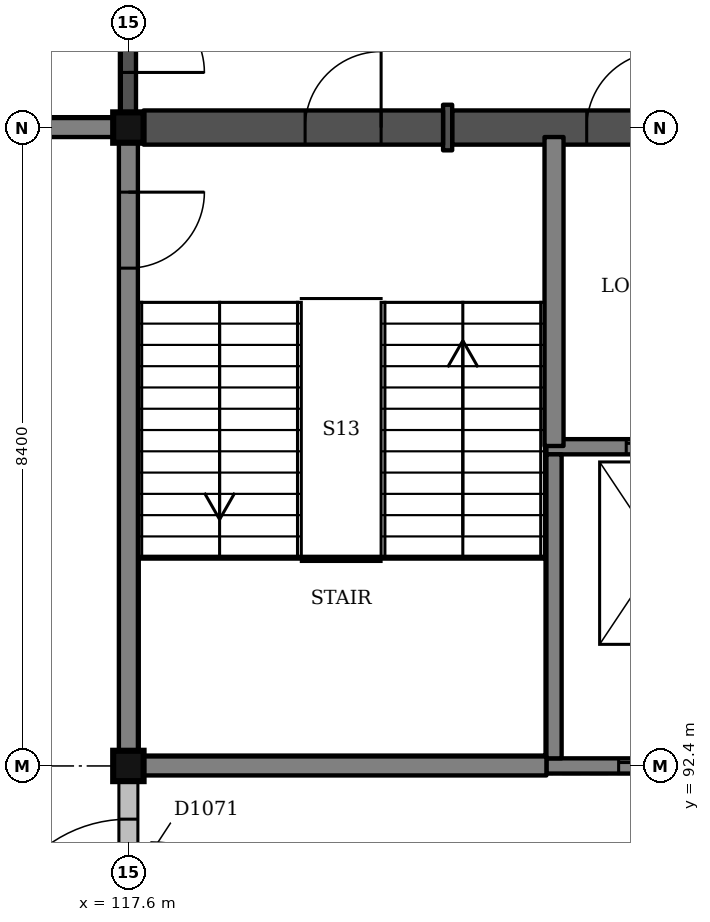
"""IFC4 building model, lengths in metres.
Left out: names, types, materials, properties, quantities, classifications, styles, units other than length and angle.
Written with IfcOpenShell. Run it as: python <this file> out.ifc"""

import sys

from ifc_helpers import new_model, si_unit, direction, frame, frame_2d, origin, origin_2d, place, context, subcontext, project, spatial, rectangle, extrude, element, fill, save


model = new_model("IFC4")
c1 = context("Model", 3, precision=1e-05, world=origin(), true_north=direction((0.0, 1.0)))
c2 = subcontext(c1, "Body", "Model", "MODEL_VIEW")
j1 = project(units=[si_unit("LENGTHUNIT", "METRE"), si_unit("PLANEANGLEUNIT", "RADIAN")], contexts=[c1])
p1 = place(None, origin())
s1 = spatial("IfcSite", under=j1, at=p1, CompositionType="ELEMENT")
p2 = place(p1, origin())
s2 = spatial("IfcBuilding", under=s1, at=p2, CompositionType="ELEMENT")
p3 = place(p2, frame((0.0, 0.0, 4.5)))
s3 = spatial("IfcBuildingStorey", under=s2, at=p3, CompositionType="ELEMENT", Elevation=4.5)
for number, where, z_axis, x_axis in (
    (1, (117.6, 92.4, -1.5), (0.0, 0.0, 1.0), (1.0, 0.0, 0.0)),
    (2, (117.6, 100.8, -1.5), (0.0, 0.0, 1.0), (1.0, 0.0, 0.0)),
):
    element("IfcColumn", number, at=place(p3, frame(where, z_axis=z_axis, x_axis=x_axis)), inside=s3, PredefinedType="COLUMN", context=c2, shape_type="SweptSolid", body=[
        extrude(rectangle(XDim=0.4, YDim=0.4, at=origin_2d()), origin(), (0.0, 0.0, 1.0), 6.0),
    ])
p4 = place(p3, frame((123.1, 92.4, 0.0), z_axis=(0.0, 0.0, 1.0), x_axis=(1.0, 0.0, 0.0)))
e3 = element("IfcWall", 3, at=p4, inside=s3, PredefinedType="SHEAR", context=c2, shape_type="SweptSolid", body=[
    extrude(rectangle(XDim=2.7, YDim=0.2, at=frame_2d((1.35, 0.0))), origin(), (0.0, 0.0, 1.0), 4.5),
])
p5 = place(p4, frame((0.95, 0.0, 0.0)))
e4 = element("IfcOpeningElement", 4, at=p5, cuts=e3, PredefinedType="OPENING", context=c2, shape_type="SweptSolid", body=[
    extrude(rectangle(XDim=1.1, YDim=2.1, at=frame_2d((0.55, 1.05))), frame((0.0, 0.11, 0.0), z_axis=(0.0, -1.0, 0.0), x_axis=(1.0, 0.0, 0.0)), (0.0, 0.0, 1.0), 0.22),
])
p6 = place(p3, frame((123.1, 96.6, 0.0), z_axis=(0.0, 0.0, 1.0), x_axis=(1.0, 0.0, 0.0)))
e5 = element("IfcWall", 5, at=p6, inside=s3, PredefinedType="SHEAR", context=c2, shape_type="SweptSolid", body=[
    extrude(rectangle(XDim=3.0, YDim=0.2, at=frame_2d((1.5, 0.0))), origin(), (0.0, 0.0, 1.0), 4.5),
])
p7 = place(p6, frame((1.05, 0.0, 0.0)))
e6 = element("IfcOpeningElement", 6, at=p7, cuts=e5, PredefinedType="OPENING", context=c2, shape_type="SweptSolid", body=[
    extrude(rectangle(XDim=1.1, YDim=2.1, at=frame_2d((0.55, 1.05))), frame((0.0, 0.11, 0.0), z_axis=(0.0, -1.0, 0.0), x_axis=(1.0, 0.0, 0.0)), (0.0, 0.0, 1.0), 0.22),
])
p8 = place(p3, frame((123.2, 92.5, 0.0), z_axis=(0.0, 0.0, 1.0), x_axis=(0.0, 1.0, 0.0)))
e7 = element("IfcWall", 7, at=p8, inside=s3, PredefinedType="SHEAR", context=c2, shape_type="SweptSolid", body=[
    extrude(rectangle(XDim=4.0, YDim=0.2, at=frame_2d((2.0, 0.0))), origin(), (0.0, 0.0, 1.0), 4.5),
])
p9 = place(p3, frame((117.8, 92.4, 0.0), z_axis=(0.0, 0.0, 1.0), x_axis=(1.0, 0.0, 0.0)))
e8 = element("IfcWall", 8, at=p9, inside=s3, PredefinedType="SHEAR", context=c2, shape_type="SweptSolid", body=[
    extrude(rectangle(XDim=5.3, YDim=0.25, at=frame_2d((2.65, 0.0))), origin(), (0.0, 0.0, 1.0), 4.5),
])
p10 = place(p3, frame((117.6, 92.6, 0.0), z_axis=(0.0, 0.0, 1.0), x_axis=(0.0, 1.0, 0.0)))
e9 = element("IfcWall", 9, at=p10, inside=s3, PredefinedType="SHEAR", context=c2, shape_type="SweptSolid", body=[
    extrude(rectangle(XDim=8.0, YDim=0.25, at=frame_2d((4.0, 0.0))), origin(), (0.0, 0.0, 1.0), 4.5),
])
p11 = place(p10, frame((6.35, 0.0, 0.0)))
e10 = element("IfcOpeningElement", 10, at=p11, cuts=e9, PredefinedType="OPENING", context=c2, shape_type="SweptSolid", body=[
    extrude(rectangle(XDim=1.0, YDim=2.1, at=frame_2d((0.5, 1.05))), frame((0.0, 0.135, 0.0), z_axis=(0.0, -1.0, 0.0), x_axis=(1.0, 0.0, 0.0)), (0.0, 0.0, 1.0), 0.27),
])
p12 = place(p3, frame((123.2, 96.61, 0.0), z_axis=(0.0, 0.0, 1.0), x_axis=(0.0, 1.0, 0.0)))
e11 = element("IfcWall", 11, at=p12, inside=s3, PredefinedType="SHEAR", context=c2, shape_type="SweptSolid", body=[
    extrude(rectangle(XDim=4.065, YDim=0.25, at=frame_2d((2.032, 0.0))), origin(), (0.0, 0.0, 1.0), 4.5),
])
p13 = place(p3, frame((111.875, 100.8, 0.0), z_axis=(0.0, 0.0, 1.0), x_axis=(1.0, 0.0, 0.0)))
e12 = element("IfcWall", 12, at=p13, inside=s3, PredefinedType="SHEAR", context=c2, shape_type="SweptSolid", body=[
    extrude(rectangle(XDim=5.525, YDim=0.25, at=frame_2d((2.762, 0.0))), origin(), (0.0, 0.0, 1.0), 4.5),
])
p14 = place(p13, frame((2.45, 0.0, 0.0)))
e13 = element("IfcOpeningElement", 13, at=p14, cuts=e12, PredefinedType="OPENING", context=c2, shape_type="SweptSolid", body=[
    extrude(rectangle(XDim=1.0, YDim=2.1, at=frame_2d((0.5, 1.05))), frame((0.0, 0.135, 0.0), z_axis=(0.0, -1.0, 0.0), x_axis=(1.0, 0.0, 0.0)), (0.0, 0.0, 1.0), 0.27),
])
p15 = place(p3, frame((125.8, 100.8, 0.0), z_axis=(0.0, 0.0, 1.0), x_axis=(-1.0, 0.0, 0.0)))
e14 = element("IfcWall", 14, at=p15, inside=s3, PredefinedType="SOLIDWALL", context=c2, shape_type="SweptSolid", body=[
    extrude(rectangle(XDim=3.94, YDim=0.45, at=frame_2d((1.97, 0.0))), origin(), (0.0, 0.0, 1.0), 3.35),
])
p16 = place(p15, frame((1.17, 0.0, 0.0)))
e15 = element("IfcOpeningElement", 15, at=p16, cuts=e14, PredefinedType="OPENING", context=c2, shape_type="SweptSolid", body=[
    extrude(rectangle(XDim=1.0, YDim=2.1, at=frame_2d((0.5, 1.05))), frame((0.0, 0.235, 0.0), z_axis=(0.0, -1.0, 0.0), x_axis=(1.0, 0.0, 0.0)), (0.0, 0.0, 1.0), 0.47),
])
p17 = place(p3, frame((121.86, 100.8, 0.0), z_axis=(0.0, 0.0, 1.0), x_axis=(-1.0, 0.0, 0.0)))
e16 = element("IfcWall", 16, at=p17, inside=s3, PredefinedType="SOLIDWALL", context=c2, shape_type="SweptSolid", body=[
    extrude(rectangle(XDim=0.12, YDim=0.6, at=frame_2d((0.06, 0.0))), origin(), (0.0, 0.0, 1.0), 3.35),
])
p18 = place(p3, frame((121.74, 100.8, 0.0), z_axis=(0.0, 0.0, 1.0), x_axis=(-1.0, 0.0, 0.0)))
e17 = element("IfcWall", 17, at=p18, inside=s3, PredefinedType="SOLIDWALL", context=c2, shape_type="SweptSolid", body=[
    extrude(rectangle(XDim=3.94, YDim=0.45, at=frame_2d((1.97, 0.0))), origin(), (0.0, 0.0, 1.0), 3.35),
])
p19 = place(p18, frame((1.815, 0.0, 0.0), z_axis=(0.0, 0.0, 1.0), x_axis=(-1.0, 0.0, 0.0)))
e18 = element("IfcOpeningElement", 18, at=p19, cuts=e17, PredefinedType="OPENING", context=c2, shape_type="SweptSolid", body=[
    extrude(rectangle(XDim=1.0, YDim=2.1, at=frame_2d((0.5, 1.05))), frame((0.0, 0.235, 0.0), z_axis=(0.0, -1.0, 0.0), x_axis=(1.0, 0.0, 0.0)), (0.0, 0.0, 1.0), 0.47),
])
p20 = place(p3, frame((117.6, 101.0, 0.0), z_axis=(0.0, 0.0, 1.0), x_axis=(0.0, 1.0, 0.0)))
e19 = element("IfcWall", 19, at=p20, inside=s3, PredefinedType="SOLIDWALL", context=c2, shape_type="SweptSolid", body=[
    extrude(rectangle(XDim=8.0, YDim=0.2, at=frame_2d((4.0, 0.0))), origin(), (0.0, 0.0, 1.0), 3.65),
])
p21 = place(p20, frame((1.525, 0.0, 0.0), z_axis=(0.0, 0.0, 1.0), x_axis=(-1.0, 0.0, 0.0)))
e20 = element("IfcOpeningElement", 20, at=p21, cuts=e19, PredefinedType="OPENING", context=c2, shape_type="SweptSolid", body=[
    extrude(rectangle(XDim=1.0, YDim=2.1, at=frame_2d((0.5, 1.05))), frame((0.0, 0.11, 0.0), z_axis=(0.0, -1.0, 0.0), x_axis=(1.0, 0.0, 0.0)), (0.0, 0.0, 1.0), 0.22),
])
p22 = place(p3, frame((117.6, 84.2, 0.0), z_axis=(0.0, 0.0, 1.0), x_axis=(0.0, 1.0, 0.0)))
e21 = element("IfcWall", 21, at=p22, inside=s3, PredefinedType="SOLIDWALL", context=c2, shape_type="SweptSolid", body=[
    extrude(rectangle(XDim=8.0, YDim=0.25, at=frame_2d((4.0, 0.0))), origin(), (0.0, 0.0, 1.0), 3.65),
])
p23 = place(p22, frame((5.7, 0.0, 0.0)))
e22 = element("IfcOpeningElement", 22, at=p23, cuts=e21, PredefinedType="OPENING", context=c2, shape_type="SweptSolid", body=[
    extrude(rectangle(XDim=1.8, YDim=2.1, at=frame_2d((0.9, 1.05))), frame((0.0, 0.135, 0.0), z_axis=(0.0, -1.0, 0.0), x_axis=(1.0, 0.0, 0.0)), (0.0, 0.0, 1.0), 0.27),
])
p24 = place(p16, origin())
e23 = element("IfcDoor", 23, at=p24, inside=s3, OperationType="SINGLE_SWING_LEFT", PredefinedType="DOOR", context=c2, shape_type="SweptSolid", body=[
    extrude(rectangle(XDim=1.0, YDim=2.1, at=frame_2d((0.5, 1.05))), frame((0.0, 0.025, 0.0), z_axis=(0.0, -1.0, 0.0), x_axis=(1.0, 0.0, 0.0)), (0.0, 0.0, 1.0), 0.05),
])
fill(e15, e23)
p25 = place(p23, origin())
e24 = element("IfcDoor", 24, at=p25, inside=s3, OperationType="DOUBLE_DOOR_SINGLE_SWING", PredefinedType="DOOR", context=c2, shape_type="SweptSolid", body=[
    extrude(rectangle(XDim=1.8, YDim=2.1, at=frame_2d((0.9, 1.05))), frame((0.0, 0.025, 0.0), z_axis=(0.0, -1.0, 0.0), x_axis=(1.0, 0.0, 0.0)), (0.0, 0.0, 1.0), 0.05),
])
fill(e22, e24)
p26 = place(p11, origin())
e25 = element("IfcDoor", 25, at=p26, inside=s3, OperationType="SINGLE_SWING_RIGHT", PredefinedType="DOOR", context=c2, shape_type="SweptSolid", body=[
    extrude(rectangle(XDim=1.0, YDim=2.1, at=frame_2d((0.5, 1.05))), frame((0.0, 0.025, 0.0), z_axis=(0.0, -1.0, 0.0), x_axis=(1.0, 0.0, 0.0)), (0.0, 0.0, 1.0), 0.05),
])
fill(e10, e25)
p27 = place(p19, origin())
e26 = element("IfcDoor", 26, at=p27, inside=s3, OperationType="SINGLE_SWING_LEFT", PredefinedType="DOOR", context=c2, shape_type="SweptSolid", body=[
    extrude(rectangle(XDim=1.0, YDim=2.1, at=frame_2d((0.5, 1.05))), frame((0.0, 0.025, 0.0), z_axis=(0.0, -1.0, 0.0), x_axis=(1.0, 0.0, 0.0)), (0.0, 0.0, 1.0), 0.05),
])
fill(e18, e26)
p28 = place(p21, origin())
e27 = element("IfcDoor", 27, at=p28, inside=s3, OperationType="SINGLE_SWING_LEFT", PredefinedType="DOOR", context=c2, shape_type="SweptSolid", body=[
    extrude(rectangle(XDim=1.0, YDim=2.1, at=frame_2d((0.5, 1.05))), frame((0.0, 0.025, 0.0), z_axis=(0.0, -1.0, 0.0), x_axis=(1.0, 0.0, 0.0)), (0.0, 0.0, 1.0), 0.05),
])
fill(e20, e27)
p29 = place(p5, origin())
e28 = element("IfcDoor", 28, at=p29, inside=s3, OperationType="SLIDING_TO_RIGHT", PredefinedType="DOOR", context=c2, shape_type="SweptSolid", body=[
    extrude(rectangle(XDim=1.1, YDim=2.1, at=frame_2d((0.55, 1.05))), frame((0.0, 0.025, 0.0), z_axis=(0.0, -1.0, 0.0), x_axis=(1.0, 0.0, 0.0)), (0.0, 0.0, 1.0), 0.05),
])
fill(e4, e28)
p30 = place(p7, origin())
e29 = element("IfcDoor", 29, at=p30, inside=s3, OperationType="SLIDING_TO_LEFT", PredefinedType="DOOR", context=c2, shape_type="SweptSolid", body=[
    extrude(rectangle(XDim=1.1, YDim=2.1, at=frame_2d((0.55, 1.05))), frame((0.0, 0.025, 0.0), z_axis=(0.0, -1.0, 0.0), x_axis=(1.0, 0.0, 0.0)), (0.0, 0.0, 1.0), 0.05),
])
fill(e6, e29)
save(model, sys.argv[1])
